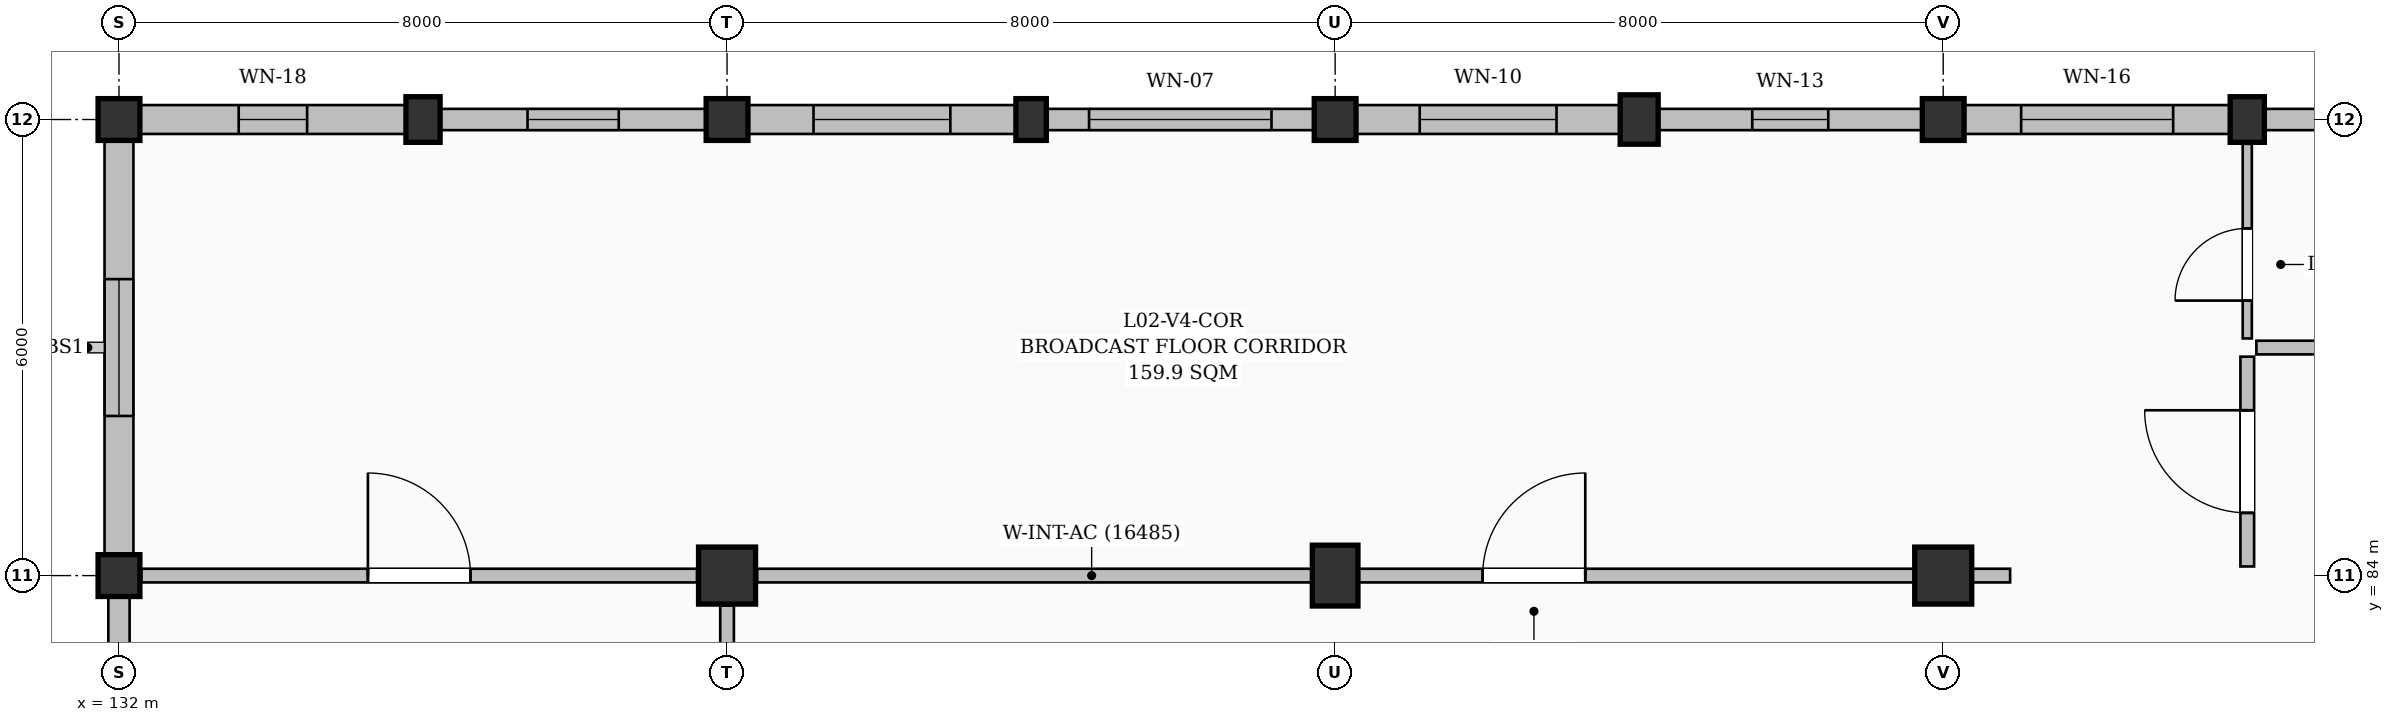
"""IFC4 building model, lengths in metres.
Left out: names, types, materials, properties, quantities, classifications, styles, units other than length and angle.
Written with IfcOpenShell. Run it as: python <this file> out.ifc"""

import sys

from ifc_helpers import new_model, si_unit, direction, frame, frame_2d, origin, origin_2d, place, context, subcontext, project, spatial, rectangle, extrude, element, fill, save


model = new_model("IFC4")
c1 = context("Model", 3, precision=1e-05, world=origin(), true_north=direction((0.0, 1.0)))
c2 = subcontext(c1, "Body", "Model", "MODEL_VIEW")
j1 = project(units=[si_unit("LENGTHUNIT", "METRE"), si_unit("PLANEANGLEUNIT", "RADIAN")], contexts=[c1])
p1 = place(None, origin())
s1 = spatial("IfcSite", under=j1, at=p1, CompositionType="ELEMENT")
p2 = place(p1, origin())
s2 = spatial("IfcBuilding", under=s1, at=p2, CompositionType="ELEMENT")
p3 = place(p2, frame((0.0, 0.0, 9.3)))
s3 = spatial("IfcBuildingStorey", under=s2, at=p3, CompositionType="ELEMENT", Elevation=9.3)
for number, where, z_axis, x_axis in (
    (1, (132.0, 84.0, 0.0), (0.0, 0.0, 1.0), (1.0, 0.0, 0.0)),
    (2, (132.0, 90.0, 0.0), (0.0, 0.0, 1.0), (1.0, 0.0, 0.0)),
):
    element("IfcColumn", number, at=place(p3, frame(where, z_axis=z_axis, x_axis=x_axis)), inside=s3, PredefinedType="COLUMN", context=c2, shape_type="SweptSolid", body=[
        extrude(rectangle(XDim=0.55, YDim=0.55, at=origin_2d()), origin(), (0.0, 0.0, 1.0), 4.5),
    ])
p4 = place(p3, frame((136.0, 90.0, 0.0), z_axis=(0.0, 0.0, 1.0), x_axis=(1.0, 0.0, 0.0)))
e3 = element("IfcColumn", 3, at=p4, inside=s3, PredefinedType="PILASTER", context=c2, shape_type="SweptSolid", body=[
    extrude(rectangle(XDim=0.45, YDim=0.6, at=origin_2d()), origin(), (0.0, 0.0, 1.0), 4.5),
])
p5 = place(p3, frame((140.0, 84.0, 0.0), z_axis=(0.0, 0.0, 1.0), x_axis=(1.0, 0.0, 0.0)))
e4 = element("IfcColumn", 4, at=p5, inside=s3, PredefinedType="COLUMN", context=c2, shape_type="SweptSolid", body=[
    extrude(rectangle(XDim=0.75, YDim=0.75, at=origin_2d()), origin(), (0.0, 0.0, 1.0), 4.5),
])
p6 = place(p3, frame((140.0, 90.0, 0.0), z_axis=(0.0, 0.0, 1.0), x_axis=(1.0, 0.0, 0.0)))
e5 = element("IfcColumn", 5, at=p6, inside=s3, PredefinedType="COLUMN", context=c2, shape_type="SweptSolid", body=[
    extrude(rectangle(XDim=0.55, YDim=0.55, at=origin_2d()), origin(), (0.0, 0.0, 1.0), 4.5),
])
p7 = place(p3, frame((144.0, 90.0, 0.0), z_axis=(0.0, 0.0, 1.0), x_axis=(1.0, 0.0, 0.0)))
e6 = element("IfcColumn", 6, at=p7, inside=s3, PredefinedType="PILASTER", context=c2, shape_type="SweptSolid", body=[
    extrude(rectangle(XDim=0.4, YDim=0.55, at=origin_2d()), origin(), (0.0, 0.0, 1.0), 4.5),
])
p8 = place(p3, frame((148.0, 84.0, 0.0), z_axis=(0.0, 0.0, 1.0), x_axis=(1.0, 0.0, 0.0)))
e7 = element("IfcColumn", 7, at=p8, inside=s3, PredefinedType="COLUMN", context=c2, shape_type="SweptSolid", body=[
    extrude(rectangle(XDim=0.6, YDim=0.8, at=origin_2d()), origin(), (0.0, 0.0, 1.0), 4.5),
])
p9 = place(p3, frame((148.0, 90.0, 0.0), z_axis=(0.0, 0.0, 1.0), x_axis=(1.0, 0.0, 0.0)))
e8 = element("IfcColumn", 8, at=p9, inside=s3, PredefinedType="COLUMN", context=c2, shape_type="SweptSolid", body=[
    extrude(rectangle(XDim=0.55, YDim=0.55, at=origin_2d()), origin(), (0.0, 0.0, 1.0), 4.5),
])
p10 = place(p3, frame((152.0, 90.0, 0.0), z_axis=(0.0, 0.0, 1.0), x_axis=(1.0, 0.0, 0.0)))
e9 = element("IfcColumn", 9, at=p10, inside=s3, PredefinedType="PILASTER", context=c2, shape_type="SweptSolid", body=[
    extrude(rectangle(XDim=0.5, YDim=0.65, at=origin_2d()), origin(), (0.0, 0.0, 1.0), 4.5),
])
p11 = place(p3, frame((156.0, 84.0, 0.0), z_axis=(0.0, 0.0, 1.0), x_axis=(1.0, 0.0, 0.0)))
e10 = element("IfcColumn", 10, at=p11, inside=s3, PredefinedType="COLUMN", context=c2, shape_type="SweptSolid", body=[
    extrude(rectangle(XDim=0.75, YDim=0.75, at=origin_2d()), origin(), (0.0, 0.0, 1.0), 4.5),
])
p12 = place(p3, frame((156.0, 90.0, 0.0), z_axis=(0.0, 0.0, 1.0), x_axis=(1.0, 0.0, 0.0)))
e11 = element("IfcColumn", 11, at=p12, inside=s3, PredefinedType="COLUMN", context=c2, shape_type="SweptSolid", body=[
    extrude(rectangle(XDim=0.55, YDim=0.55, at=origin_2d()), origin(), (0.0, 0.0, 1.0), 4.5),
])
p13 = place(p3, frame((160.0, 90.0, 0.0), z_axis=(0.0, 0.0, 1.0), x_axis=(1.0, 0.0, 0.0)))
e12 = element("IfcColumn", 12, at=p13, inside=s3, PredefinedType="PILASTER", context=c2, shape_type="SweptSolid", body=[
    extrude(rectangle(XDim=0.45, YDim=0.6, at=origin_2d()), origin(), (0.0, 0.0, 1.0), 4.5),
])
p14 = place(p3, frame((132.0, 76.275, 0.0), z_axis=(0.0, 0.0, 1.0), x_axis=(0.0, 1.0, 0.0)))
e13 = element("IfcWall", 13, at=p14, inside=s3, PredefinedType="SOLIDWALL", context=c2, shape_type="SweptSolid", body=[
    extrude(rectangle(XDim=7.45, YDim=0.28, at=frame_2d((3.725, 0.0))), origin(), (0.0, 0.0, 1.0), 4.27),
])
p15 = place(p14, frame((3.125, 0.0, 0.95)))
e14 = element("IfcOpeningElement", 14, at=p15, cuts=e13, PredefinedType="OPENING", context=c2, shape_type="SweptSolid", body=[
    extrude(rectangle(XDim=1.2, YDim=1.8, at=frame_2d((0.6, 0.9))), frame((0.0, 0.15, 0.0), z_axis=(0.0, -1.0, 0.0), x_axis=(1.0, 0.0, 0.0)), (0.0, 0.0, 1.0), 0.3),
])
p16 = place(p3, frame((132.0, 84.275, 0.0), z_axis=(0.0, 0.0, 1.0), x_axis=(0.0, 1.0, 0.0)))
e15 = element("IfcWall", 15, at=p16, inside=s3, PredefinedType="SOLIDWALL", context=c2, shape_type="SweptSolid", body=[
    extrude(rectangle(XDim=5.45, YDim=0.38, at=frame_2d((2.725, 0.0))), origin(), (0.0, 0.0, 1.0), 4.27),
])
p17 = place(p16, frame((1.825, 0.0, 0.95)))
e16 = element("IfcOpeningElement", 16, at=p17, cuts=e15, PredefinedType="OPENING", context=c2, shape_type="SweptSolid", body=[
    extrude(rectangle(XDim=1.8, YDim=1.8, at=frame_2d((0.9, 0.9))), frame((0.0, 0.2, 0.0), z_axis=(0.0, -1.0, 0.0), x_axis=(1.0, 0.0, 0.0)), (0.0, 0.0, 1.0), 0.4),
])
p18 = place(p3, frame((132.275, 90.0, 0.0), z_axis=(0.0, 0.0, 1.0), x_axis=(1.0, 0.0, 0.0)))
e17 = element("IfcWall", 17, at=p18, inside=s3, PredefinedType="SOLIDWALL", context=c2, shape_type="SweptSolid", body=[
    extrude(rectangle(XDim=3.5, YDim=0.38, at=frame_2d((1.75, 0.0))), origin(), (0.0, 0.0, 1.0), 4.27),
])
p19 = place(p18, frame((1.3, 0.0, 0.95)))
e18 = element("IfcOpeningElement", 18, at=p19, cuts=e17, PredefinedType="OPENING", context=c2, shape_type="SweptSolid", body=[
    extrude(rectangle(XDim=0.9, YDim=1.8, at=frame_2d((0.45, 0.9))), frame((0.0, 0.2, 0.0), z_axis=(0.0, -1.0, 0.0), x_axis=(1.0, 0.0, 0.0)), (0.0, 0.0, 1.0), 0.4),
])
p20 = place(p3, frame((136.225, 90.0, 0.0), z_axis=(0.0, 0.0, 1.0), x_axis=(1.0, 0.0, 0.0)))
e19 = element("IfcWall", 19, at=p20, inside=s3, PredefinedType="SOLIDWALL", context=c2, shape_type="SweptSolid", body=[
    extrude(rectangle(XDim=3.5, YDim=0.28, at=frame_2d((1.75, 0.0))), origin(), (0.0, 0.0, 1.0), 4.27),
])
p21 = place(p20, frame((1.15, 0.0, 0.95)))
e20 = element("IfcOpeningElement", 20, at=p21, cuts=e19, PredefinedType="OPENING", context=c2, shape_type="SweptSolid", body=[
    extrude(rectangle(XDim=1.2, YDim=1.8, at=frame_2d((0.6, 0.9))), frame((0.0, 0.15, 0.0), z_axis=(0.0, -1.0, 0.0), x_axis=(1.0, 0.0, 0.0)), (0.0, 0.0, 1.0), 0.3),
])
p22 = place(p3, frame((140.275, 90.0, 0.0), z_axis=(0.0, 0.0, 1.0), x_axis=(1.0, 0.0, 0.0)))
e21 = element("IfcWall", 21, at=p22, inside=s3, PredefinedType="SOLIDWALL", context=c2, shape_type="SweptSolid", body=[
    extrude(rectangle(XDim=3.525, YDim=0.38, at=frame_2d((1.763, 0.0))), origin(), (0.0, 0.0, 1.0), 3.755),
])
p23 = place(p22, frame((0.863, 0.0, 0.95)))
e22 = element("IfcOpeningElement", 22, at=p23, cuts=e21, PredefinedType="OPENING", context=c2, shape_type="SweptSolid", body=[
    extrude(rectangle(XDim=1.8, YDim=1.8, at=frame_2d((0.9, 0.9))), frame((0.0, 0.2, 0.0), z_axis=(0.0, -1.0, 0.0), x_axis=(1.0, 0.0, 0.0)), (0.0, 0.0, 1.0), 0.4),
])
p24 = place(p3, frame((144.2, 90.0, 0.0), z_axis=(0.0, 0.0, 1.0), x_axis=(1.0, 0.0, 0.0)))
e23 = element("IfcWall", 23, at=p24, inside=s3, PredefinedType="SOLIDWALL", context=c2, shape_type="SweptSolid", body=[
    extrude(rectangle(XDim=3.525, YDim=0.28, at=frame_2d((1.763, 0.0))), origin(), (0.0, 0.0, 1.0), 3.755),
])
p25 = place(p24, frame((0.562, 0.0, 0.95)))
e24 = element("IfcOpeningElement", 24, at=p25, cuts=e23, PredefinedType="OPENING", context=c2, shape_type="SweptSolid", body=[
    extrude(rectangle(XDim=2.4, YDim=1.8, at=frame_2d((1.2, 0.9))), frame((0.0, 0.15, 0.0), z_axis=(0.0, -1.0, 0.0), x_axis=(1.0, 0.0, 0.0)), (0.0, 0.0, 1.0), 0.3),
])
p26 = place(p3, frame((148.275, 90.0, 0.0), z_axis=(0.0, 0.0, 1.0), x_axis=(1.0, 0.0, 0.0)))
e25 = element("IfcWall", 25, at=p26, inside=s3, PredefinedType="SOLIDWALL", context=c2, shape_type="SweptSolid", body=[
    extrude(rectangle(XDim=3.475, YDim=0.38, at=frame_2d((1.738, 0.0))), origin(), (0.0, 0.0, 1.0), 3.705),
])
p27 = place(p26, frame((0.837, 0.0, 0.95)))
e26 = element("IfcOpeningElement", 26, at=p27, cuts=e25, PredefinedType="OPENING", context=c2, shape_type="SweptSolid", body=[
    extrude(rectangle(XDim=1.8, YDim=1.5, at=frame_2d((0.9, 0.75))), frame((0.0, 0.2, 0.0), z_axis=(0.0, -1.0, 0.0), x_axis=(1.0, 0.0, 0.0)), (0.0, 0.0, 1.0), 0.4),
])
p28 = place(p3, frame((152.25, 90.0, 0.0), z_axis=(0.0, 0.0, 1.0), x_axis=(1.0, 0.0, 0.0)))
e27 = element("IfcWall", 27, at=p28, inside=s3, PredefinedType="SOLIDWALL", context=c2, shape_type="SweptSolid", body=[
    extrude(rectangle(XDim=3.475, YDim=0.28, at=frame_2d((1.738, 0.0))), origin(), (0.0, 0.0, 1.0), 3.705),
])
p29 = place(p28, frame((1.238, 0.0, 0.95)))
e28 = element("IfcOpeningElement", 28, at=p29, cuts=e27, PredefinedType="OPENING", context=c2, shape_type="SweptSolid", body=[
    extrude(rectangle(XDim=1.0, YDim=1.4, at=frame_2d((0.5, 0.7))), frame((0.0, 0.15, 0.0), z_axis=(0.0, -1.0, 0.0), x_axis=(1.0, 0.0, 0.0)), (0.0, 0.0, 1.0), 0.3),
])
p30 = place(p3, frame((156.275, 90.0, 0.0), z_axis=(0.0, 0.0, 1.0), x_axis=(1.0, 0.0, 0.0)))
e29 = element("IfcWall", 29, at=p30, inside=s3, PredefinedType="SOLIDWALL", context=c2, shape_type="SweptSolid", body=[
    extrude(rectangle(XDim=3.5, YDim=0.38, at=frame_2d((1.75, 0.0))), origin(), (0.0, 0.0, 1.0), 3.655),
])
p31 = place(p30, frame((0.75, 0.0, 0.95)))
e30 = element("IfcOpeningElement", 30, at=p31, cuts=e29, PredefinedType="OPENING", context=c2, shape_type="SweptSolid", body=[
    extrude(rectangle(XDim=2.0, YDim=1.2, at=frame_2d((1.0, 0.6))), frame((0.0, 0.2, 0.0), z_axis=(0.0, -1.0, 0.0), x_axis=(1.0, 0.0, 0.0)), (0.0, 0.0, 1.0), 0.4),
])
p32 = place(p3, frame((160.225, 90.0, 0.0), z_axis=(0.0, 0.0, 1.0), x_axis=(1.0, 0.0, 0.0)))
e31 = element("IfcWall", 31, at=p32, inside=s3, PredefinedType="SOLIDWALL", context=c2, shape_type="SweptSolid", body=[
    extrude(rectangle(XDim=3.5, YDim=0.28, at=frame_2d((1.75, 0.0))), origin(), (0.0, 0.0, 1.0), 3.655),
])
p33 = place(p32, frame((1.2, 0.0, 0.95)))
e32 = element("IfcOpeningElement", 32, at=p33, cuts=e31, PredefinedType="OPENING", context=c2, shape_type="SweptSolid", body=[
    extrude(rectangle(XDim=1.1, YDim=2.0, at=frame_2d((0.55, 1.0))), frame((0.0, 0.15, 0.0), z_axis=(0.0, -1.0, 0.0), x_axis=(1.0, 0.0, 0.0)), (0.0, 0.0, 1.0), 0.3),
])
p34 = place(p3, frame((140.0, 68.395, 0.0), z_axis=(0.0, 0.0, 1.0), x_axis=(0.0, 1.0, 0.0)))
e33 = element("IfcWall", 33, at=p34, inside=s3, PredefinedType="PARTITIONING", context=c2, shape_type="SweptSolid", body=[
    extrude(rectangle(XDim=15.21, YDim=0.18, at=frame_2d((7.605, 0.0))), origin(), (0.0, 0.0, 1.0), 3.655),
])
p35 = place(p34, frame((5.105, 0.0, 0.0)))
e34 = element("IfcOpeningElement", 34, at=p35, cuts=e33, PredefinedType="OPENING", context=c2, shape_type="SweptSolid", body=[
    extrude(rectangle(XDim=1.35, YDim=2.2, at=frame_2d((0.675, 1.1))), frame((0.0, 0.1, 0.0), z_axis=(0.0, -1.0, 0.0), x_axis=(1.0, 0.0, 0.0)), (0.0, 0.0, 1.0), 0.2),
])
p36 = place(p3, frame((140.395, 84.0, 0.0), z_axis=(0.0, 0.0, 1.0), x_axis=(1.0, 0.0, 0.0)))
e35 = element("IfcWall", 35, at=p36, inside=s3, PredefinedType="PARTITIONING", context=c2, shape_type="SweptSolid", body=[
    extrude(rectangle(XDim=16.485, YDim=0.18, at=frame_2d((8.242, 0.0))), origin(), (0.0, 0.0, 1.0), 3.405),
])
p37 = place(p36, frame((9.546, 0.0, 0.0)))
e36 = element("IfcOpeningElement", 36, at=p37, cuts=e35, PredefinedType="OPENING", context=c2, shape_type="SweptSolid", body=[
    extrude(rectangle(XDim=1.35, YDim=2.2, at=frame_2d((0.675, 1.1))), frame((0.0, 0.1, 0.0), z_axis=(0.0, -1.0, 0.0), x_axis=(1.0, 0.0, 0.0)), (0.0, 0.0, 1.0), 0.2),
])
p38 = place(p3, frame((132.295, 84.0, 0.0), z_axis=(0.0, 0.0, 1.0), x_axis=(1.0, 0.0, 0.0)))
e37 = element("IfcWall", 37, at=p38, inside=s3, PredefinedType="PARTITIONING", context=c2, shape_type="SweptSolid", body=[
    extrude(rectangle(XDim=7.31, YDim=0.18, at=frame_2d((3.655, 0.0))), origin(), (0.0, 0.0, 1.0), 4.27),
])
p39 = place(p38, frame((2.98, 0.0, 0.0)))
e38 = element("IfcOpeningElement", 38, at=p39, cuts=e37, PredefinedType="OPENING", context=c2, shape_type="SweptSolid", body=[
    extrude(rectangle(XDim=1.35, YDim=2.2, at=frame_2d((0.675, 1.1))), frame((0.0, 0.1, 0.0), z_axis=(0.0, -1.0, 0.0), x_axis=(1.0, 0.0, 0.0)), (0.0, 0.0, 1.0), 0.2),
])
p40 = place(p3, frame((160.0, 84.12, 0.0), z_axis=(0.0, 0.0, 1.0), x_axis=(0.0, 1.0, 0.0)))
e39 = element("IfcWall", 39, at=p40, inside=s3, PredefinedType="PARTITIONING", context=c2, shape_type="SweptSolid", body=[
    extrude(rectangle(XDim=2.76, YDim=0.18, at=frame_2d((1.38, 0.0))), origin(), (0.0, 0.0, 1.0), 4.27),
])
p41 = place(p40, frame((0.705, 0.0, 0.0)))
e40 = element("IfcOpeningElement", 40, at=p41, cuts=e39, PredefinedType="OPENING", context=c2, shape_type="SweptSolid", body=[
    extrude(rectangle(XDim=1.35, YDim=2.2, at=frame_2d((0.675, 1.1))), frame((0.0, 0.1, 0.0), z_axis=(0.0, -1.0, 0.0), x_axis=(1.0, 0.0, 0.0)), (0.0, 0.0, 1.0), 0.2),
])
p42 = place(p3, frame((160.0, 87.12, 0.0), z_axis=(0.0, 0.0, 1.0), x_axis=(0.0, 1.0, 0.0)))
e41 = element("IfcWall", 41, at=p42, inside=s3, PredefinedType="PARTITIONING", context=c2, shape_type="SweptSolid", body=[
    extrude(rectangle(XDim=2.56, YDim=0.12, at=frame_2d((1.28, 0.0))), origin(), (0.0, 0.0, 1.0), 4.27),
])
p43 = place(p42, frame((0.498, 0.0, 0.0)))
e42 = element("IfcOpeningElement", 42, at=p43, cuts=e41, PredefinedType="OPENING", context=c2, shape_type="SweptSolid", body=[
    extrude(rectangle(XDim=0.95, YDim=2.1, at=frame_2d((0.475, 1.05))), frame((0.0, 0.07, 0.0), z_axis=(0.0, -1.0, 0.0), x_axis=(1.0, 0.0, 0.0)), (0.0, 0.0, 1.0), 0.14),
])
p44 = place(p3, frame((160.12, 87.0, 0.0), z_axis=(0.0, 0.0, 1.0), x_axis=(1.0, 0.0, 0.0)))
e43 = element("IfcWall", 43, at=p44, inside=s3, PredefinedType="PARTITIONING", context=c2, shape_type="SweptSolid", body=[
    extrude(rectangle(XDim=8.76, YDim=0.18, at=frame_2d((4.38, 0.0))), origin(), (0.0, 0.0, 1.0), 3.855),
])
p45 = place(p17, origin())
e44 = element("IfcWindow", 44, at=p45, inside=s3, PartitioningType="DOUBLE_PANEL_VERTICAL", PredefinedType="WINDOW", context=c2, shape_type="SweptSolid", body=[
    extrude(rectangle(XDim=1.8, YDim=1.8, at=frame_2d((0.9, 0.9))), frame((0.0, 0.03, 0.0), z_axis=(0.0, -1.0, 0.0), x_axis=(1.0, 0.0, 0.0)), (0.0, 0.0, 1.0), 0.06),
])
fill(e16, e44)
p46 = place(p19, origin())
e45 = element("IfcWindow", 45, at=p46, inside=s3, PartitioningType="SINGLE_PANEL", PredefinedType="WINDOW", context=c2, shape_type="SweptSolid", body=[
    extrude(rectangle(XDim=0.9, YDim=1.8, at=frame_2d((0.45, 0.9))), frame((0.0, 0.03, 0.0), z_axis=(0.0, -1.0, 0.0), x_axis=(1.0, 0.0, 0.0)), (0.0, 0.0, 1.0), 0.06),
])
fill(e18, e45)
p47 = place(p21, origin())
e46 = element("IfcWindow", 46, at=p47, inside=s3, PartitioningType="SINGLE_PANEL", PredefinedType="WINDOW", context=c2, shape_type="SweptSolid", body=[
    extrude(rectangle(XDim=1.2, YDim=1.8, at=frame_2d((0.6, 0.9))), frame((0.0, 0.03, 0.0), z_axis=(0.0, -1.0, 0.0), x_axis=(1.0, 0.0, 0.0)), (0.0, 0.0, 1.0), 0.06),
])
fill(e20, e46)
p48 = place(p23, origin())
e47 = element("IfcWindow", 47, at=p48, inside=s3, PartitioningType="DOUBLE_PANEL_VERTICAL", PredefinedType="WINDOW", context=c2, shape_type="SweptSolid", body=[
    extrude(rectangle(XDim=1.8, YDim=1.8, at=frame_2d((0.9, 0.9))), frame((0.0, 0.03, 0.0), z_axis=(0.0, -1.0, 0.0), x_axis=(1.0, 0.0, 0.0)), (0.0, 0.0, 1.0), 0.06),
])
fill(e22, e47)
p49 = place(p25, origin())
e48 = element("IfcWindow", 48, at=p49, inside=s3, PartitioningType="TRIPLE_PANEL_VERTICAL", PredefinedType="WINDOW", context=c2, shape_type="SweptSolid", body=[
    extrude(rectangle(XDim=2.4, YDim=1.8, at=frame_2d((1.2, 0.9))), frame((0.0, 0.03, 0.0), z_axis=(0.0, -1.0, 0.0), x_axis=(1.0, 0.0, 0.0)), (0.0, 0.0, 1.0), 0.06),
])
fill(e24, e48)
p50 = place(p27, origin())
e49 = element("IfcWindow", 49, at=p50, inside=s3, PartitioningType="DOUBLE_PANEL_VERTICAL", PredefinedType="WINDOW", context=c2, shape_type="SweptSolid", body=[
    extrude(rectangle(XDim=1.8, YDim=1.5, at=frame_2d((0.9, 0.75))), frame((0.0, 0.03, 0.0), z_axis=(0.0, -1.0, 0.0), x_axis=(1.0, 0.0, 0.0)), (0.0, 0.0, 1.0), 0.06),
])
fill(e26, e49)
p51 = place(p29, origin())
e50 = element("IfcWindow", 50, at=p51, inside=s3, PartitioningType="SINGLE_PANEL", PredefinedType="WINDOW", context=c2, shape_type="SweptSolid", body=[
    extrude(rectangle(XDim=1.0, YDim=1.4, at=frame_2d((0.5, 0.7))), frame((0.0, 0.03, 0.0), z_axis=(0.0, -1.0, 0.0), x_axis=(1.0, 0.0, 0.0)), (0.0, 0.0, 1.0), 0.06),
])
fill(e28, e50)
p52 = place(p31, origin())
e51 = element("IfcWindow", 51, at=p52, inside=s3, PartitioningType="DOUBLE_PANEL_HORIZONTAL", PredefinedType="WINDOW", context=c2, shape_type="SweptSolid", body=[
    extrude(rectangle(XDim=2.0, YDim=1.2, at=frame_2d((1.0, 0.6))), frame((0.0, 0.03, 0.0), z_axis=(0.0, -1.0, 0.0), x_axis=(1.0, 0.0, 0.0)), (0.0, 0.0, 1.0), 0.06),
])
fill(e30, e51)
p53 = place(p37, origin())
e52 = element("IfcDoor", 52, at=p53, inside=s3, OperationType="SINGLE_SWING_RIGHT", PredefinedType="DOOR", context=c2, shape_type="SweptSolid", body=[
    extrude(rectangle(XDim=1.35, YDim=2.2, at=frame_2d((0.675, 1.1))), frame((0.0, 0.025, 0.0), z_axis=(0.0, -1.0, 0.0), x_axis=(1.0, 0.0, 0.0)), (0.0, 0.0, 1.0), 0.05),
])
fill(e36, e52)
p54 = place(p39, origin())
e53 = element("IfcDoor", 53, at=p54, inside=s3, OperationType="SINGLE_SWING_LEFT", PredefinedType="DOOR", context=c2, shape_type="SweptSolid", body=[
    extrude(rectangle(XDim=1.35, YDim=2.2, at=frame_2d((0.675, 1.1))), frame((0.0, 0.025, 0.0), z_axis=(0.0, -1.0, 0.0), x_axis=(1.0, 0.0, 0.0)), (0.0, 0.0, 1.0), 0.05),
])
fill(e38, e53)
p55 = place(p41, origin())
e54 = element("IfcDoor", 54, at=p55, inside=s3, OperationType="SINGLE_SWING_RIGHT", PredefinedType="DOOR", context=c2, shape_type="SweptSolid", body=[
    extrude(rectangle(XDim=1.35, YDim=2.2, at=frame_2d((0.675, 1.1))), frame((0.0, 0.025, 0.0), z_axis=(0.0, -1.0, 0.0), x_axis=(1.0, 0.0, 0.0)), (0.0, 0.0, 1.0), 0.05),
])
fill(e40, e54)
p56 = place(p43, origin())
e55 = element("IfcDoor", 55, at=p56, inside=s3, OperationType="SINGLE_SWING_LEFT", PredefinedType="DOOR", context=c2, shape_type="SweptSolid", body=[
    extrude(rectangle(XDim=0.95, YDim=2.1, at=frame_2d((0.475, 1.05))), frame((0.0, 0.025, 0.0), z_axis=(0.0, -1.0, 0.0), x_axis=(1.0, 0.0, 0.0)), (0.0, 0.0, 1.0), 0.05),
])
fill(e42, e55)
save(model, sys.argv[1])
